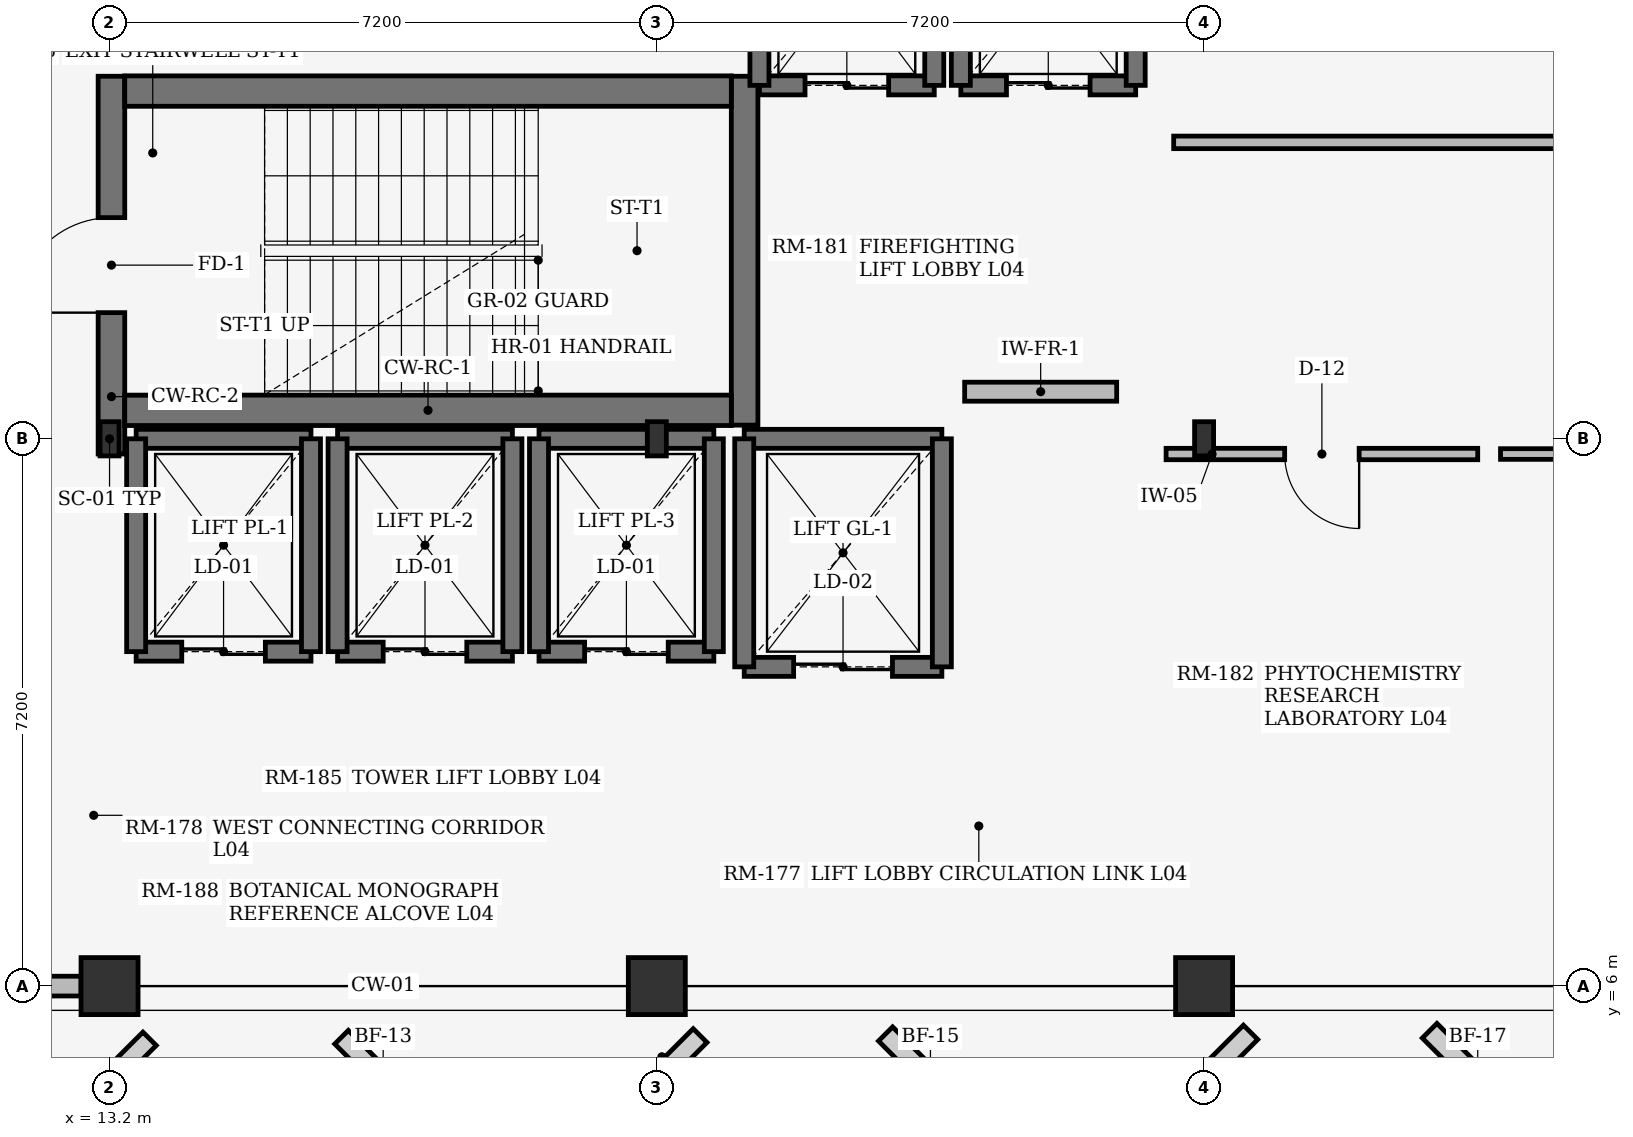
"""IFC4 building model, lengths in metres.
Left out: names, types, materials, properties, quantities, classifications, styles, units other than length and angle.
Written with IfcOpenShell. Run it as: python <this file> out.ifc"""

import sys

from ifc_helpers import new_model, si_unit, direction, frame, frame_2d, origin, origin_2d, place, context, subcontext, project, spatial, rectangle, i_section, extrude, element, fill, save


model = new_model("IFC4")
c1 = context("Model", 3, precision=1e-05, world=origin(), true_north=direction((0.0, 1.0)))
c2 = subcontext(c1, "Body", "Model", "MODEL_VIEW")
j1 = project(units=[si_unit("LENGTHUNIT", "METRE"), si_unit("PLANEANGLEUNIT", "RADIAN")], contexts=[c1])
p1 = place(None, origin())
s1 = spatial("IfcSite", under=j1, at=p1, CompositionType="ELEMENT")
p2 = place(p1, origin())
s2 = spatial("IfcBuilding", under=s1, at=p2, CompositionType="ELEMENT")
p3 = place(p2, frame((0.0, 0.0, 17.1)))
s3 = spatial("IfcBuildingStorey", under=s2, at=p3, CompositionType="ELEMENT", Elevation=17.1)
p4 = place(p3, frame((13.2, 6.0, 0.0), z_axis=(0.0, 0.0, 1.0), x_axis=(1.0, 0.0, 0.0)))
e1 = element("IfcColumn", 1, at=p4, inside=s3, PredefinedType="COLUMN", context=c2, shape_type="SweptSolid", body=[
    extrude(rectangle(XDim=0.75, YDim=0.75, at=origin_2d()), origin(), (0.0, 0.0, 1.0), 3.66),
])
p5 = place(p3, frame((13.2, 13.2, 0.0), z_axis=(0.0, 0.0, 1.0), x_axis=(1.0, 0.0, 0.0)))
e2 = element("IfcColumn", 2, at=p5, inside=s3, PredefinedType="COLUMN", context=c2, shape_type="SweptSolid", body=[
    extrude(i_section(OverallWidth=0.25, OverallDepth=0.45, WebThickness=0.011, FlangeThickness=0.014, at=origin_2d()), origin(), (0.0, 0.0, 1.0), 3.66),
])
p6 = place(p3, frame((20.4, 6.0, 0.0), z_axis=(0.0, 0.0, 1.0), x_axis=(1.0, 0.0, 0.0)))
e3 = element("IfcColumn", 3, at=p6, inside=s3, PredefinedType="COLUMN", context=c2, shape_type="SweptSolid", body=[
    extrude(rectangle(XDim=0.75, YDim=0.75, at=origin_2d()), origin(), (0.0, 0.0, 1.0), 3.66),
])
p7 = place(p3, frame((20.4, 13.2, 0.0), z_axis=(0.0, 0.0, 1.0), x_axis=(1.0, 0.0, 0.0)))
e4 = element("IfcColumn", 4, at=p7, inside=s3, PredefinedType="COLUMN", context=c2, shape_type="SweptSolid", body=[
    extrude(i_section(OverallWidth=0.25, OverallDepth=0.45, WebThickness=0.011, FlangeThickness=0.014, at=origin_2d()), origin(), (0.0, 0.0, 1.0), 3.66),
])
p8 = place(p3, frame((27.6, 6.0, 0.0), z_axis=(0.0, 0.0, 1.0), x_axis=(1.0, 0.0, 0.0)))
e5 = element("IfcColumn", 5, at=p8, inside=s3, PredefinedType="COLUMN", context=c2, shape_type="SweptSolid", body=[
    extrude(rectangle(XDim=0.75, YDim=0.75, at=origin_2d()), origin(), (0.0, 0.0, 1.0), 3.66),
])
p9 = place(p3, frame((27.6, 13.2, 0.0), z_axis=(0.0, 0.0, 1.0), x_axis=(1.0, 0.0, 0.0)))
e6 = element("IfcColumn", 6, at=p9, inside=s3, PredefinedType="COLUMN", context=c2, shape_type="SweptSolid", body=[
    extrude(i_section(OverallWidth=0.25, OverallDepth=0.45, WebThickness=0.011, FlangeThickness=0.014, at=origin_2d()), origin(), (0.0, 0.0, 1.0), 3.66),
])
p10 = place(p3, frame((6.375, 6.0, 0.0), z_axis=(0.0, 0.0, 1.0), x_axis=(1.0, 0.0, 0.0)))
e7 = element("IfcWall", 7, at=p10, inside=s3, PredefinedType="STANDARD", context=c2, shape_type="SweptSolid", body=[
    extrude(rectangle(XDim=6.45, YDim=0.26, at=frame_2d((3.225, 0.0))), origin(), (0.0, 0.0, 1.0), 3.04),
])
p11 = place(p10, frame((2.525, 0.0, 0.75)))
e8 = element("IfcOpeningElement", 8, at=p11, cuts=e7, PredefinedType="OPENING", context=c2, shape_type="SweptSolid", body=[
    extrude(rectangle(XDim=1.4, YDim=1.25, at=frame_2d((0.7, 0.625))), frame((0.0, 0.14, 0.0), z_axis=(0.0, -1.0, 0.0), x_axis=(1.0, 0.0, 0.0)), (0.0, 0.0, 1.0), 0.28),
])
p12 = place(p3, frame((13.225, 13.0, 0.0), z_axis=(0.0, 0.0, 1.0), x_axis=(0.0, 1.0, 0.0)))
e9 = element("IfcWall", 9, at=p12, inside=s3, PredefinedType="SHEAR", context=c2, shape_type="SweptSolid", body=[
    extrude(rectangle(XDim=4.97, YDim=0.35, at=frame_2d((2.485, 0.0))), origin(), (0.0, 0.0, 1.0), 3.66),
])
p13 = place(p12, frame((1.86, 0.0, 0.0)))
e10 = element("IfcOpeningElement", 10, at=p13, cuts=e9, PredefinedType="OPENING", context=c2, shape_type="SweptSolid", body=[
    extrude(rectangle(XDim=1.25, YDim=2.2, at=frame_2d((0.625, 1.1))), frame((0.0, 0.185, 0.0), z_axis=(0.0, -1.0, 0.0), x_axis=(1.0, 0.0, 0.0)), (0.0, 0.0, 1.0), 0.37),
])
p14 = place(p3, frame((21.555, 13.38, 0.0), z_axis=(0.0, 0.0, 1.0), x_axis=(0.0, 1.0, 0.0)))
e11 = element("IfcWall", 11, at=p14, inside=s3, PredefinedType="SHEAR", context=c2, shape_type="SweptSolid", body=[
    extrude(rectangle(XDim=4.59, YDim=0.35, at=frame_2d((2.295, 0.0))), origin(), (0.0, 0.0, 1.0), 3.66),
])
for number, where, z_axis, x_axis in (
    (12, (13.4, 13.575, 0.0), (0.0, 0.0, 1.0), (1.0, 0.0, 0.0)),
    (13, (13.4, 17.775, 0.0), (0.0, 0.0, 1.0), (1.0, 0.0, 0.0)),
):
    element("IfcWall", number, at=place(p3, frame(where, z_axis=z_axis, x_axis=x_axis)), inside=s3, PredefinedType="SHEAR", context=c2, shape_type="SweptSolid", body=[
        extrude(rectangle(XDim=7.98, YDim=0.4, at=frame_2d((3.99, 0.0))), origin(), (0.0, 0.0, 1.0), 3.66),
    ])
p15 = place(p3, frame((21.75, 17.85, 0.0), z_axis=(0.0, 0.0, 1.0), x_axis=(1.0, 0.0, 0.0)))
e14 = element("IfcWall", 14, at=p15, inside=s3, PredefinedType="SHEAR", context=c2, shape_type="SweptSolid", body=[
    extrude(rectangle(XDim=2.3, YDim=0.25, at=frame_2d((1.15, 0.0))), origin(), (0.0, 0.0, 1.0), 3.66),
])
p16 = place(p15, frame((0.6, 0.0, 0.0)))
e15 = element("IfcOpeningElement", 15, at=p16, cuts=e14, PredefinedType="OPENING", context=c2, shape_type="SweptSolid", body=[
    extrude(rectangle(XDim=1.1, YDim=2.2, at=frame_2d((0.55, 1.1))), frame((0.0, 0.135, 0.0), z_axis=(0.0, -1.0, 0.0), x_axis=(1.0, 0.0, 0.0)), (0.0, 0.0, 1.0), 0.27),
])
for number, where, z_axis, x_axis in (
    (16, (21.75, 17.85, 0.0), (0.0, 0.0, 1.0), (0.0, 1.0, 0.0)),
    (17, (24.05, 17.85, 0.0), (0.0, 0.0, 1.0), (0.0, 1.0, 0.0)),
):
    element("IfcWall", number, at=place(p3, frame(where, z_axis=z_axis, x_axis=x_axis)), inside=s3, PredefinedType="SHEAR", context=c2, shape_type="SweptSolid", body=[
        extrude(rectangle(XDim=2.7, YDim=0.25, at=frame_2d((1.35, 0.0))), origin(), (0.0, 0.0, 1.0), 3.66),
    ])
p17 = place(p3, frame((24.4, 17.85, 0.0), z_axis=(0.0, 0.0, 1.0), x_axis=(1.0, 0.0, 0.0)))
e18 = element("IfcWall", 18, at=p17, inside=s3, PredefinedType="SHEAR", context=c2, shape_type="SweptSolid", body=[
    extrude(rectangle(XDim=2.3, YDim=0.25, at=frame_2d((1.15, 0.0))), origin(), (0.0, 0.0, 1.0), 3.66),
])
p18 = place(p17, frame((0.6, 0.0, 0.0)))
e19 = element("IfcOpeningElement", 19, at=p18, cuts=e18, PredefinedType="OPENING", context=c2, shape_type="SweptSolid", body=[
    extrude(rectangle(XDim=1.1, YDim=2.2, at=frame_2d((0.55, 1.1))), frame((0.0, 0.135, 0.0), z_axis=(0.0, -1.0, 0.0), x_axis=(1.0, 0.0, 0.0)), (0.0, 0.0, 1.0), 0.27),
])
for number, where, z_axis, x_axis in (
    (20, (24.4, 17.85, 0.0), (0.0, 0.0, 1.0), (0.0, 1.0, 0.0)),
    (21, (26.7, 17.85, 0.0), (0.0, 0.0, 1.0), (0.0, 1.0, 0.0)),
):
    element("IfcWall", number, at=place(p3, frame(where, z_axis=z_axis, x_axis=x_axis)), inside=s3, PredefinedType="SHEAR", context=c2, shape_type="SweptSolid", body=[
        extrude(rectangle(XDim=2.7, YDim=0.25, at=frame_2d((1.35, 0.0))), origin(), (0.0, 0.0, 1.0), 3.66),
    ])
p19 = place(p3, frame((13.55, 10.4, 0.0), z_axis=(0.0, 0.0, 1.0), x_axis=(1.0, 0.0, 0.0)))
e22 = element("IfcWall", 22, at=p19, inside=s3, PredefinedType="SHEAR", context=c2, shape_type="SweptSolid", body=[
    extrude(rectangle(XDim=2.3, YDim=0.25, at=frame_2d((1.15, 0.0))), origin(), (0.0, 0.0, 1.0), 3.66),
])
p20 = place(p19, frame((0.6, 0.0, 0.0)))
e23 = element("IfcOpeningElement", 23, at=p20, cuts=e22, PredefinedType="OPENING", context=c2, shape_type="SweptSolid", body=[
    extrude(rectangle(XDim=1.1, YDim=2.2, at=frame_2d((0.55, 1.1))), frame((0.0, 0.135, 0.0), z_axis=(0.0, -1.0, 0.0), x_axis=(1.0, 0.0, 0.0)), (0.0, 0.0, 1.0), 0.27),
])
p21 = place(p3, frame((13.55, 13.2, 0.0), z_axis=(0.0, 0.0, 1.0), x_axis=(1.0, 0.0, 0.0)))
e24 = element("IfcWall", 24, at=p21, inside=s3, PredefinedType="SHEAR", context=c2, shape_type="SweptSolid", body=[
    extrude(rectangle(XDim=2.3, YDim=0.25, at=frame_2d((1.15, 0.0))), origin(), (0.0, 0.0, 1.0), 3.66),
])
for number, where, z_axis, x_axis in (
    (25, (13.55, 10.4, 0.0), (0.0, 0.0, 1.0), (0.0, 1.0, 0.0)),
    (26, (15.85, 10.4, 0.0), (0.0, 0.0, 1.0), (0.0, 1.0, 0.0)),
):
    element("IfcWall", number, at=place(p3, frame(where, z_axis=z_axis, x_axis=x_axis)), inside=s3, PredefinedType="SHEAR", context=c2, shape_type="SweptSolid", body=[
        extrude(rectangle(XDim=2.8, YDim=0.25, at=frame_2d((1.4, 0.0))), origin(), (0.0, 0.0, 1.0), 3.66),
    ])
p22 = place(p3, frame((16.2, 10.4, 0.0), z_axis=(0.0, 0.0, 1.0), x_axis=(1.0, 0.0, 0.0)))
e27 = element("IfcWall", 27, at=p22, inside=s3, PredefinedType="SHEAR", context=c2, shape_type="SweptSolid", body=[
    extrude(rectangle(XDim=2.3, YDim=0.25, at=frame_2d((1.15, 0.0))), origin(), (0.0, 0.0, 1.0), 3.66),
])
p23 = place(p22, frame((0.6, 0.0, 0.0)))
e28 = element("IfcOpeningElement", 28, at=p23, cuts=e27, PredefinedType="OPENING", context=c2, shape_type="SweptSolid", body=[
    extrude(rectangle(XDim=1.1, YDim=2.2, at=frame_2d((0.55, 1.1))), frame((0.0, 0.135, 0.0), z_axis=(0.0, -1.0, 0.0), x_axis=(1.0, 0.0, 0.0)), (0.0, 0.0, 1.0), 0.27),
])
p24 = place(p3, frame((16.2, 13.2, 0.0), z_axis=(0.0, 0.0, 1.0), x_axis=(1.0, 0.0, 0.0)))
e29 = element("IfcWall", 29, at=p24, inside=s3, PredefinedType="SHEAR", context=c2, shape_type="SweptSolid", body=[
    extrude(rectangle(XDim=2.3, YDim=0.25, at=frame_2d((1.15, 0.0))), origin(), (0.0, 0.0, 1.0), 3.66),
])
for number, where, z_axis, x_axis in (
    (30, (16.2, 10.4, 0.0), (0.0, 0.0, 1.0), (0.0, 1.0, 0.0)),
    (31, (18.5, 10.4, 0.0), (0.0, 0.0, 1.0), (0.0, 1.0, 0.0)),
):
    element("IfcWall", number, at=place(p3, frame(where, z_axis=z_axis, x_axis=x_axis)), inside=s3, PredefinedType="SHEAR", context=c2, shape_type="SweptSolid", body=[
        extrude(rectangle(XDim=2.8, YDim=0.25, at=frame_2d((1.4, 0.0))), origin(), (0.0, 0.0, 1.0), 3.66),
    ])
p25 = place(p3, frame((18.85, 10.4, 0.0), z_axis=(0.0, 0.0, 1.0), x_axis=(1.0, 0.0, 0.0)))
e32 = element("IfcWall", 32, at=p25, inside=s3, PredefinedType="SHEAR", context=c2, shape_type="SweptSolid", body=[
    extrude(rectangle(XDim=2.3, YDim=0.25, at=frame_2d((1.15, 0.0))), origin(), (0.0, 0.0, 1.0), 3.66),
])
p26 = place(p25, frame((0.6, 0.0, 0.0)))
e33 = element("IfcOpeningElement", 33, at=p26, cuts=e32, PredefinedType="OPENING", context=c2, shape_type="SweptSolid", body=[
    extrude(rectangle(XDim=1.1, YDim=2.2, at=frame_2d((0.55, 1.1))), frame((0.0, 0.135, 0.0), z_axis=(0.0, -1.0, 0.0), x_axis=(1.0, 0.0, 0.0)), (0.0, 0.0, 1.0), 0.27),
])
p27 = place(p3, frame((18.85, 13.2, 0.0), z_axis=(0.0, 0.0, 1.0), x_axis=(1.0, 0.0, 0.0)))
e34 = element("IfcWall", 34, at=p27, inside=s3, PredefinedType="SHEAR", context=c2, shape_type="SweptSolid", body=[
    extrude(rectangle(XDim=2.3, YDim=0.25, at=frame_2d((1.15, 0.0))), origin(), (0.0, 0.0, 1.0), 3.66),
])
for number, where, z_axis, x_axis in (
    (35, (18.85, 10.4, 0.0), (0.0, 0.0, 1.0), (0.0, 1.0, 0.0)),
    (36, (21.15, 10.4, 0.0), (0.0, 0.0, 1.0), (0.0, 1.0, 0.0)),
):
    element("IfcWall", number, at=place(p3, frame(where, z_axis=z_axis, x_axis=x_axis)), inside=s3, PredefinedType="SHEAR", context=c2, shape_type="SweptSolid", body=[
        extrude(rectangle(XDim=2.8, YDim=0.25, at=frame_2d((1.4, 0.0))), origin(), (0.0, 0.0, 1.0), 3.66),
    ])
p28 = place(p3, frame((21.55, 10.2, 0.0), z_axis=(0.0, 0.0, 1.0), x_axis=(1.0, 0.0, 0.0)))
e37 = element("IfcWall", 37, at=p28, inside=s3, PredefinedType="SHEAR", context=c2, shape_type="SweptSolid", body=[
    extrude(rectangle(XDim=2.6, YDim=0.25, at=frame_2d((1.3, 0.0))), origin(), (0.0, 0.0, 1.0), 3.66),
])
p29 = place(p28, frame((0.65, 0.0, 0.0)))
e38 = element("IfcOpeningElement", 38, at=p29, cuts=e37, PredefinedType="OPENING", context=c2, shape_type="SweptSolid", body=[
    extrude(rectangle(XDim=1.3, YDim=2.25, at=frame_2d((0.65, 1.125))), frame((0.0, 0.135, 0.0), z_axis=(0.0, -1.0, 0.0), x_axis=(1.0, 0.0, 0.0)), (0.0, 0.0, 1.0), 0.27),
])
p30 = place(p3, frame((21.55, 13.2, 0.0), z_axis=(0.0, 0.0, 1.0), x_axis=(1.0, 0.0, 0.0)))
e39 = element("IfcWall", 39, at=p30, inside=s3, PredefinedType="SHEAR", context=c2, shape_type="SweptSolid", body=[
    extrude(rectangle(XDim=2.6, YDim=0.25, at=frame_2d((1.3, 0.0))), origin(), (0.0, 0.0, 1.0), 3.66),
])
for number, where, z_axis, x_axis in (
    (40, (21.55, 10.2, 0.0), (0.0, 0.0, 1.0), (0.0, 1.0, 0.0)),
    (41, (24.15, 10.2, 0.0), (0.0, 0.0, 1.0), (0.0, 1.0, 0.0)),
):
    element("IfcWall", number, at=place(p3, frame(where, z_axis=z_axis, x_axis=x_axis)), inside=s3, PredefinedType="SHEAR", context=c2, shape_type="SweptSolid", body=[
        extrude(rectangle(XDim=3.0, YDim=0.25, at=frame_2d((1.5, 0.0))), origin(), (0.0, 0.0, 1.0), 3.66),
    ])
p31 = place(p3, frame((24.45, 13.82, 0.0), z_axis=(0.0, 0.0, 1.0), x_axis=(1.0, 0.0, 0.0)))
e42 = element("IfcWall", 42, at=p31, inside=s3, PredefinedType="SOLIDWALL", context=c2, shape_type="SweptSolid", body=[
    extrude(rectangle(XDim=2.0, YDim=0.25, at=frame_2d((1.0, 0.0))), origin(), (0.0, 0.0, 1.0), 3.64),
])
p32 = place(p3, frame((27.2, 17.1, 0.0), z_axis=(0.0, 0.0, 1.0), x_axis=(1.0, 0.0, 0.0)))
e43 = element("IfcWall", 43, at=p32, inside=s3, PredefinedType="PARTITIONING", context=c2, shape_type="SweptSolid", body=[
    extrude(rectangle(XDim=14.25, YDim=0.165, at=frame_2d((7.125, 0.0))), origin(), (0.0, 0.0, 1.0), 3.64),
])
p33 = place(p32, frame((6.665, 0.0, 0.0)))
e44 = element("IfcOpeningElement", 44, at=p33, cuts=e43, PredefinedType="OPENING", context=c2, shape_type="SweptSolid", body=[
    extrude(rectangle(XDim=0.92, YDim=2.1, at=frame_2d((0.46, 1.05))), frame((0.0, 0.093, 0.0), z_axis=(0.0, -1.0, 0.0), x_axis=(1.0, 0.0, 0.0)), (0.0, 0.0, 1.0), 0.185),
])
p34 = place(p3, frame((27.1, 13.0, 0.0), z_axis=(0.0, 0.0, 1.0), x_axis=(1.0, 0.0, 0.0)))
e45 = element("IfcWall", 45, at=p34, inside=s3, PredefinedType="PARTITIONING", context=c2, shape_type="SweptSolid", body=[
    extrude(rectangle(XDim=4.1, YDim=0.15, at=frame_2d((2.05, 0.0))), origin(), (0.0, 0.0, 1.0), 3.64),
])
p35 = place(p34, frame((1.56, 0.0, 0.0)))
e46 = element("IfcOpeningElement", 46, at=p35, cuts=e45, PredefinedType="OPENING", context=c2, shape_type="SweptSolid", body=[
    extrude(rectangle(XDim=0.98, YDim=2.1, at=frame_2d((0.49, 1.05))), frame((0.0, 0.085, 0.0), z_axis=(0.0, -1.0, 0.0), x_axis=(1.0, 0.0, 0.0)), (0.0, 0.0, 1.0), 0.17),
])
p36 = place(p3, frame((31.5, 13.0, 0.0), z_axis=(0.0, 0.0, 1.0), x_axis=(1.0, 0.0, 0.0)))
e47 = element("IfcWall", 47, at=p36, inside=s3, PredefinedType="PARTITIONING", context=c2, shape_type="SweptSolid", body=[
    extrude(rectangle(XDim=9.95, YDim=0.14, at=frame_2d((4.975, 0.0))), origin(), (0.0, 0.0, 1.0), 3.64),
])
p37 = place(p36, frame((4.435, 0.0, 0.0)))
e48 = element("IfcOpeningElement", 48, at=p37, cuts=e47, PredefinedType="OPENING", context=c2, shape_type="SweptSolid", body=[
    extrude(rectangle(XDim=1.08, YDim=2.1, at=frame_2d((0.54, 1.05))), frame((0.0, 0.08, 0.0), z_axis=(0.0, -1.0, 0.0), x_axis=(1.0, 0.0, 0.0)), (0.0, 0.0, 1.0), 0.16),
])
p38 = place(p13, origin())
e49 = element("IfcDoor", 49, at=p38, inside=s3, OperationType="SINGLE_SWING_LEFT", PredefinedType="DOOR", context=c2, shape_type="SweptSolid", body=[
    extrude(rectangle(XDim=1.25, YDim=2.2, at=frame_2d((0.625, 1.1))), frame((0.0, 0.025, 0.0), z_axis=(0.0, -1.0, 0.0), x_axis=(1.0, 0.0, 0.0)), (0.0, 0.0, 1.0), 0.05),
])
fill(e10, e49)
p39 = place(p16, origin())
e50 = element("IfcDoor", 50, at=p39, inside=s3, OperationType="DOUBLE_DOOR_SLIDING", PredefinedType="DOOR", context=c2, shape_type="SweptSolid", body=[
    extrude(rectangle(XDim=1.1, YDim=2.2, at=frame_2d((0.55, 1.1))), frame((0.0, 0.025, 0.0), z_axis=(0.0, -1.0, 0.0), x_axis=(1.0, 0.0, 0.0)), (0.0, 0.0, 1.0), 0.05),
])
fill(e15, e50)
p40 = place(p18, origin())
e51 = element("IfcDoor", 51, at=p40, inside=s3, OperationType="DOUBLE_DOOR_SLIDING", PredefinedType="DOOR", context=c2, shape_type="SweptSolid", body=[
    extrude(rectangle(XDim=1.1, YDim=2.2, at=frame_2d((0.55, 1.1))), frame((0.0, 0.025, 0.0), z_axis=(0.0, -1.0, 0.0), x_axis=(1.0, 0.0, 0.0)), (0.0, 0.0, 1.0), 0.05),
])
fill(e19, e51)
p41 = place(p20, origin())
e52 = element("IfcDoor", 52, at=p41, inside=s3, OperationType="DOUBLE_DOOR_SLIDING", PredefinedType="DOOR", context=c2, shape_type="SweptSolid", body=[
    extrude(rectangle(XDim=1.1, YDim=2.2, at=frame_2d((0.55, 1.1))), frame((0.0, 0.025, 0.0), z_axis=(0.0, -1.0, 0.0), x_axis=(1.0, 0.0, 0.0)), (0.0, 0.0, 1.0), 0.05),
])
fill(e23, e52)
p42 = place(p23, origin())
e53 = element("IfcDoor", 53, at=p42, inside=s3, OperationType="DOUBLE_DOOR_SLIDING", PredefinedType="DOOR", context=c2, shape_type="SweptSolid", body=[
    extrude(rectangle(XDim=1.1, YDim=2.2, at=frame_2d((0.55, 1.1))), frame((0.0, 0.025, 0.0), z_axis=(0.0, -1.0, 0.0), x_axis=(1.0, 0.0, 0.0)), (0.0, 0.0, 1.0), 0.05),
])
fill(e28, e53)
p43 = place(p26, origin())
e54 = element("IfcDoor", 54, at=p43, inside=s3, OperationType="DOUBLE_DOOR_SLIDING", PredefinedType="DOOR", context=c2, shape_type="SweptSolid", body=[
    extrude(rectangle(XDim=1.1, YDim=2.2, at=frame_2d((0.55, 1.1))), frame((0.0, 0.025, 0.0), z_axis=(0.0, -1.0, 0.0), x_axis=(1.0, 0.0, 0.0)), (0.0, 0.0, 1.0), 0.05),
])
fill(e33, e54)
p44 = place(p29, origin())
e55 = element("IfcDoor", 55, at=p44, inside=s3, OperationType="DOUBLE_DOOR_SLIDING", PredefinedType="DOOR", context=c2, shape_type="SweptSolid", body=[
    extrude(rectangle(XDim=1.3, YDim=2.25, at=frame_2d((0.65, 1.125))), frame((0.0, 0.025, 0.0), z_axis=(0.0, -1.0, 0.0), x_axis=(1.0, 0.0, 0.0)), (0.0, 0.0, 1.0), 0.05),
])
fill(e38, e55)
p45 = place(p35, origin())
e56 = element("IfcDoor", 56, at=p45, inside=s3, OperationType="SINGLE_SWING_RIGHT", PredefinedType="DOOR", context=c2, shape_type="SweptSolid", body=[
    extrude(rectangle(XDim=0.98, YDim=2.1, at=frame_2d((0.49, 1.05))), frame((0.0, 0.025, 0.0), z_axis=(0.0, -1.0, 0.0), x_axis=(1.0, 0.0, 0.0)), (0.0, 0.0, 1.0), 0.05),
])
fill(e46, e56)
save(model, sys.argv[1])
